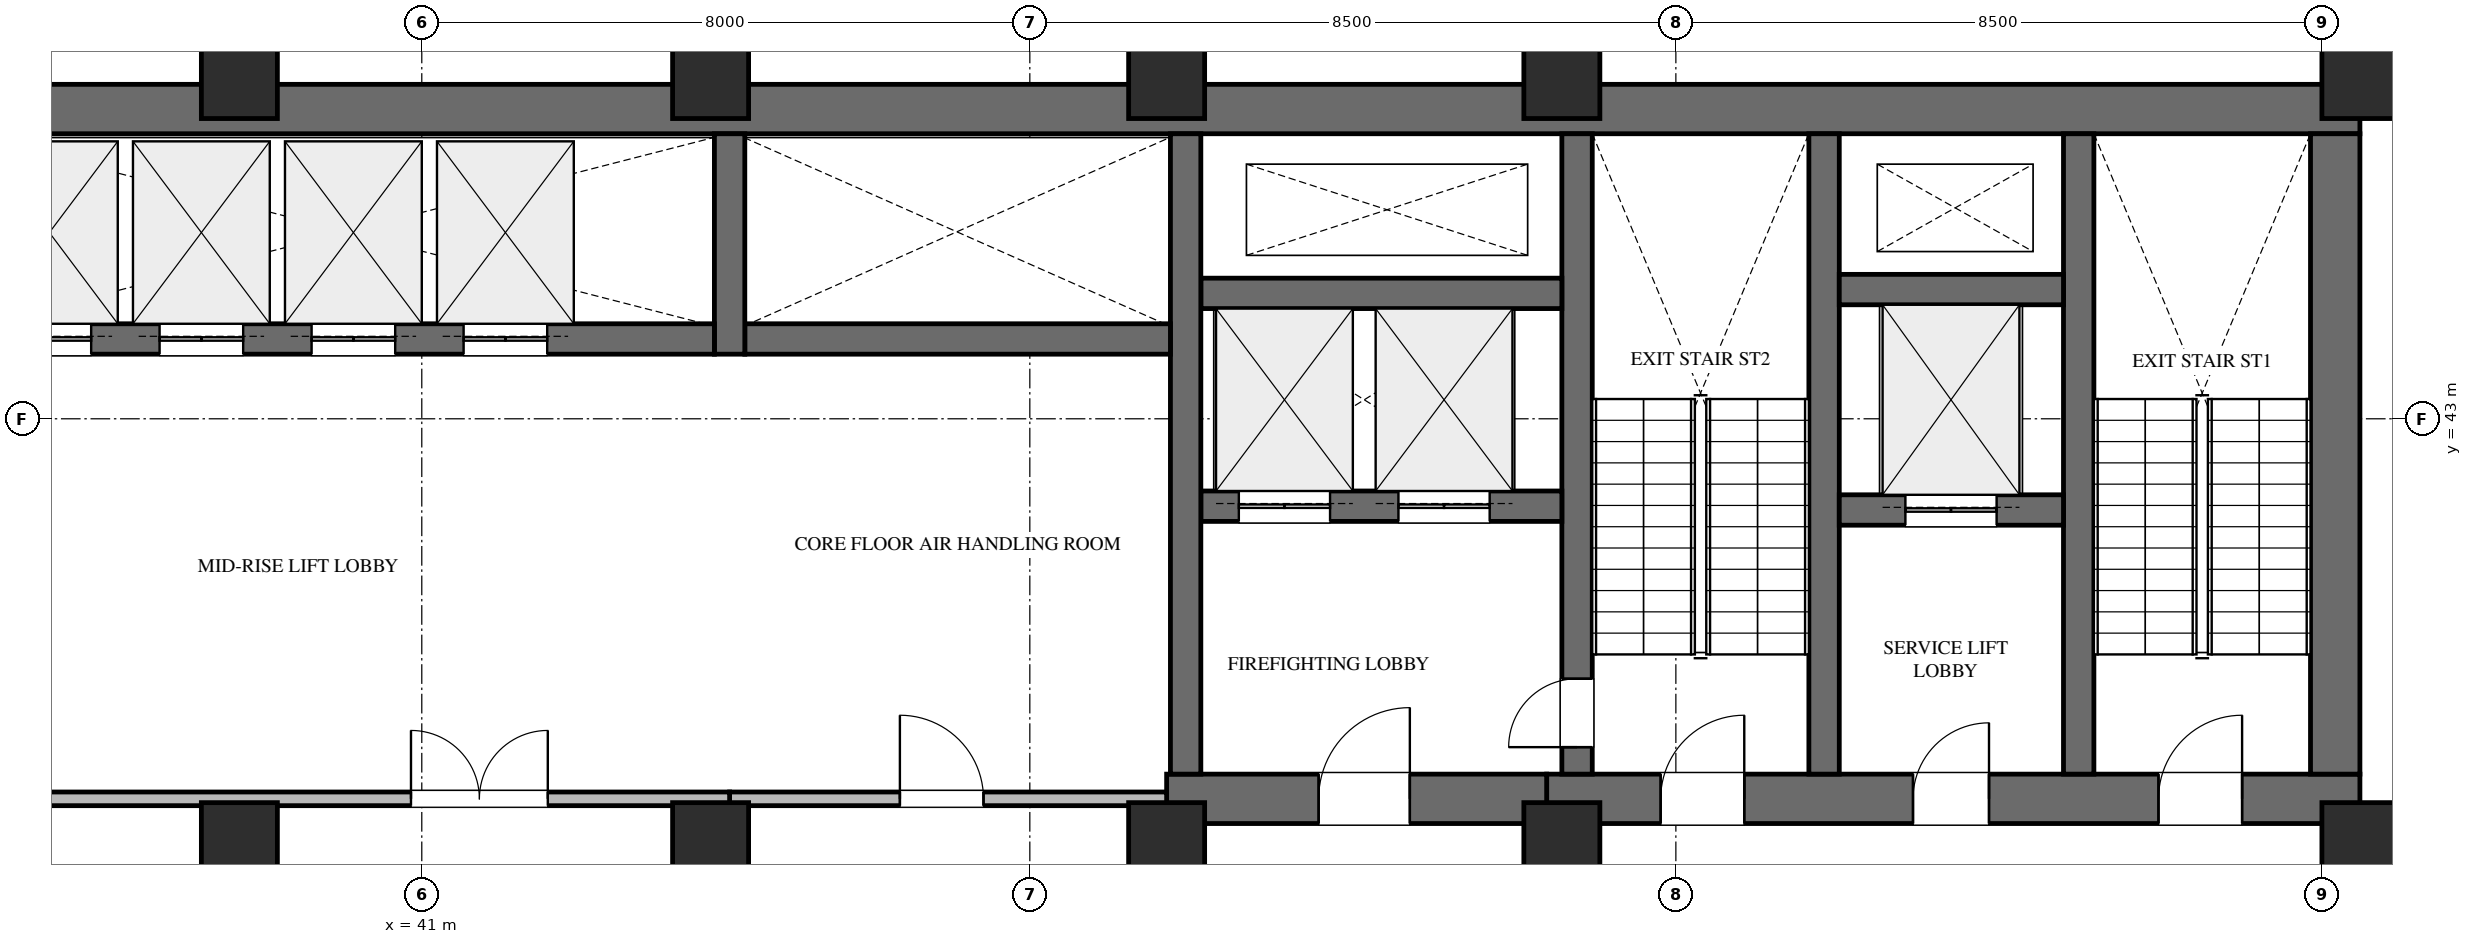
"""IFC4 building model, lengths in metres.
Left out: names, types, materials, properties, quantities, classifications, styles, units other than length and angle.
Written with IfcOpenShell. Run it as: python <this file> out.ifc"""

import sys

from ifc_helpers import new_model, si_unit, direction, frame, frame_2d, origin, origin_2d, place, context, subcontext, project, spatial, rectangle, extrude, element, fill, save


model = new_model("IFC4")
c1 = context("Model", 3, precision=1e-05, world=origin(), true_north=direction((0.0, 1.0)))
c2 = subcontext(c1, "Body", "Model", "MODEL_VIEW")
j1 = project(units=[si_unit("LENGTHUNIT", "METRE"), si_unit("PLANEANGLEUNIT", "RADIAN")], contexts=[c1])
p1 = place(None, origin())
s1 = spatial("IfcSite", under=j1, at=p1, CompositionType="ELEMENT")
p2 = place(p1, origin())
s2 = spatial("IfcBuilding", under=s1, at=p2, CompositionType="ELEMENT")
p3 = place(p2, frame((0.0, 0.0, 156.0)))
s3 = spatial("IfcBuildingStorey", under=s2, at=p3, CompositionType="ELEMENT", Elevation=156.0)
p4 = place(p3, frame((22.9, 47.075, 0.0), z_axis=(0.0, 0.0, 1.0), x_axis=(1.0, 0.0, 0.0)))
e1 = element("IfcWall", 1, at=p4, inside=s3, PredefinedType="SHEAR", context=c2, shape_type="SweptSolid", body=[
    extrude(rectangle(XDim=43.6, YDim=0.65, at=frame_2d((21.8, 0.0))), origin(), (0.0, 0.0, 1.0), 4.5),
])
p5 = place(p3, frame((55.8, 38.0, 0.0), z_axis=(0.0, 0.0, 1.0), x_axis=(1.0, 0.0, 0.0)))
e2 = element("IfcWall", 2, at=p5, inside=s3, PredefinedType="SHEAR", context=c2, shape_type="SweptSolid", body=[
    extrude(rectangle(XDim=10.7, YDim=0.65, at=frame_2d((5.35, 0.0))), origin(), (0.0, 0.0, 1.0), 4.5),
])
p6 = place(p5, frame((1.5, 0.0, 0.0)))
e3 = element("IfcOpeningElement", 3, at=p6, cuts=e2, PredefinedType="OPENING", context=c2, shape_type="SweptSolid", body=[
    extrude(rectangle(XDim=1.1, YDim=2.2, at=frame_2d((0.55, 1.1))), frame((0.0, 0.335, 0.0), z_axis=(0.0, -1.0, 0.0), x_axis=(1.0, 0.0, 0.0)), (0.0, 0.0, 1.0), 0.67),
])
p7 = place(p5, frame((4.82, 0.0, 0.0)))
e4 = element("IfcOpeningElement", 4, at=p7, cuts=e2, PredefinedType="OPENING", context=c2, shape_type="SweptSolid", body=[
    extrude(rectangle(XDim=1.0, YDim=2.15, at=frame_2d((0.5, 1.075))), frame((0.0, 0.335, 0.0), z_axis=(0.0, -1.0, 0.0), x_axis=(1.0, 0.0, 0.0)), (0.0, 0.0, 1.0), 0.67),
])
p8 = place(p5, frame((8.05, 0.0, 0.0)))
e5 = element("IfcOpeningElement", 5, at=p8, cuts=e2, PredefinedType="OPENING", context=c2, shape_type="SweptSolid", body=[
    extrude(rectangle(XDim=1.1, YDim=2.2, at=frame_2d((0.55, 1.1))), frame((0.0, 0.335, 0.0), z_axis=(0.0, -1.0, 0.0), x_axis=(1.0, 0.0, 0.0)), (0.0, 0.0, 1.0), 0.67),
])
p9 = place(p3, frame((66.175, 38.325, 0.0), z_axis=(0.0, 0.0, 1.0), x_axis=(0.0, 1.0, 0.0)))
e6 = element("IfcWall", 6, at=p9, inside=s3, PredefinedType="SHEAR", context=c2, shape_type="SweptSolid", body=[
    extrude(rectangle(XDim=8.425, YDim=0.65, at=frame_2d((4.212, 0.0))), origin(), (0.0, 0.0, 1.0), 4.5),
])
for number, where, z_axis, x_axis in (
    (7, (62.8, 38.325, 0.0), (0.0, 0.0, 1.0), (0.0, 1.0, 0.0)),
    (8, (59.45, 38.325, 0.0), (0.0, 0.0, 1.0), (0.0, 1.0, 0.0)),
):
    element("IfcWall", number, at=place(p3, frame(where, z_axis=z_axis, x_axis=x_axis)), inside=s3, PredefinedType="SHEAR", context=c2, shape_type="SweptSolid", body=[
        extrude(rectangle(XDim=8.425, YDim=0.4, at=frame_2d((4.212, 0.0))), origin(), (0.0, 0.0, 1.0), 4.5),
    ])
p10 = place(p3, frame((56.2, 38.325, 0.0), z_axis=(0.0, 0.0, 1.0), x_axis=(0.0, 1.0, 0.0)))
e9 = element("IfcWall", 9, at=p10, inside=s3, PredefinedType="SHEAR", context=c2, shape_type="SweptSolid", body=[
    extrude(rectangle(XDim=8.425, YDim=0.4, at=frame_2d((4.212, 0.0))), origin(), (0.0, 0.0, 1.0), 4.5),
])
p11 = place(p10, frame((0.355, 0.0, 0.0)))
e10 = element("IfcOpeningElement", 10, at=p11, cuts=e9, PredefinedType="OPENING", context=c2, shape_type="SweptSolid", body=[
    extrude(rectangle(XDim=0.9, YDim=2.15, at=frame_2d((0.45, 1.075))), frame((0.0, 0.21, 0.0), z_axis=(0.0, -1.0, 0.0), x_axis=(1.0, 0.0, 0.0)), (0.0, 0.0, 1.0), 0.42),
])
p12 = place(p3, frame((59.65, 41.8, 0.0), z_axis=(0.0, 0.0, 1.0), x_axis=(1.0, 0.0, 0.0)))
e11 = element("IfcWall", 11, at=p12, inside=s3, PredefinedType="SHEAR", context=c2, shape_type="SweptSolid", body=[
    extrude(rectangle(XDim=2.95, YDim=0.4, at=frame_2d((1.475, 0.0))), origin(), (0.0, 0.0, 1.0), 4.5),
])
p13 = place(p12, frame((0.87, 0.0, 0.0)))
e12 = element("IfcOpeningElement", 12, at=p13, cuts=e11, PredefinedType="OPENING", context=c2, shape_type="SweptSolid", body=[
    extrude(rectangle(XDim=1.2, YDim=2.2, at=frame_2d((0.6, 1.1))), frame((0.0, 0.21, 0.0), z_axis=(0.0, -1.0, 0.0), x_axis=(1.0, 0.0, 0.0)), (0.0, 0.0, 1.0), 0.42),
])
p14 = place(p3, frame((59.65, 44.7, 0.0), z_axis=(0.0, 0.0, 1.0), x_axis=(1.0, 0.0, 0.0)))
e13 = element("IfcWall", 13, at=p14, inside=s3, PredefinedType="SHEAR", context=c2, shape_type="SweptSolid", body=[
    extrude(rectangle(XDim=2.95, YDim=0.4, at=frame_2d((1.475, 0.0))), origin(), (0.0, 0.0, 1.0), 4.5),
])
p15 = place(p3, frame((50.8, 38.0, 0.0), z_axis=(0.0, 0.0, 1.0), x_axis=(1.0, 0.0, 0.0)))
e14 = element("IfcWall", 14, at=p15, inside=s3, PredefinedType="SHEAR", context=c2, shape_type="SweptSolid", body=[
    extrude(rectangle(XDim=5.0, YDim=0.65, at=frame_2d((2.5, 0.0))), origin(), (0.0, 0.0, 1.0), 4.5),
])
p16 = place(p15, frame((2.0, 0.0, 0.0)))
e15 = element("IfcOpeningElement", 15, at=p16, cuts=e14, PredefinedType="OPENING", context=c2, shape_type="SweptSolid", body=[
    extrude(rectangle(XDim=1.2, YDim=2.2, at=frame_2d((0.6, 1.1))), frame((0.0, 0.335, 0.0), z_axis=(0.0, -1.0, 0.0), x_axis=(1.0, 0.0, 0.0)), (0.0, 0.0, 1.0), 0.67),
])
p17 = place(p3, frame((51.25, 41.85, 0.0), z_axis=(0.0, 0.0, 1.0), x_axis=(1.0, 0.0, 0.0)))
e16 = element("IfcWall", 16, at=p17, inside=s3, PredefinedType="SHEAR", context=c2, shape_type="SweptSolid", body=[
    extrude(rectangle(XDim=4.75, YDim=0.4, at=frame_2d((2.375, 0.0))), origin(), (0.0, 0.0, 1.0), 4.5),
])
p18 = place(p17, frame((0.5, 0.0, 0.0)))
e17 = element("IfcOpeningElement", 17, at=p18, cuts=e16, PredefinedType="OPENING", context=c2, shape_type="SweptSolid", body=[
    extrude(rectangle(XDim=1.2, YDim=2.2, at=frame_2d((0.6, 1.1))), frame((0.0, 0.21, 0.0), z_axis=(0.0, -1.0, 0.0), x_axis=(1.0, 0.0, 0.0)), (0.0, 0.0, 1.0), 0.42),
])
p19 = place(p17, frame((2.6, 0.0, 0.0)))
e18 = element("IfcOpeningElement", 18, at=p19, cuts=e16, PredefinedType="OPENING", context=c2, shape_type="SweptSolid", body=[
    extrude(rectangle(XDim=1.2, YDim=2.2, at=frame_2d((0.6, 1.1))), frame((0.0, 0.21, 0.0), z_axis=(0.0, -1.0, 0.0), x_axis=(1.0, 0.0, 0.0)), (0.0, 0.0, 1.0), 0.42),
])
p20 = place(p3, frame((51.25, 44.65, 0.0), z_axis=(0.0, 0.0, 1.0), x_axis=(1.0, 0.0, 0.0)))
e19 = element("IfcWall", 19, at=p20, inside=s3, PredefinedType="SHEAR", context=c2, shape_type="SweptSolid", body=[
    extrude(rectangle(XDim=4.75, YDim=0.4, at=frame_2d((2.375, 0.0))), origin(), (0.0, 0.0, 1.0), 4.5),
])
p21 = place(p3, frame((51.05, 38.325, 0.0), z_axis=(0.0, 0.0, 1.0), x_axis=(0.0, 1.0, 0.0)))
e20 = element("IfcWall", 20, at=p21, inside=s3, PredefinedType="SHEAR", context=c2, shape_type="SweptSolid", body=[
    extrude(rectangle(XDim=8.425, YDim=0.4, at=frame_2d((4.212, 0.0))), origin(), (0.0, 0.0, 1.0), 4.5),
])
p22 = place(p3, frame((45.25, 44.05, 0.0), z_axis=(0.0, 0.0, 1.0), x_axis=(1.0, 0.0, 0.0)))
e21 = element("IfcWall", 21, at=p22, inside=s3, PredefinedType="SHEAR", context=c2, shape_type="SweptSolid", body=[
    extrude(rectangle(XDim=5.6, YDim=0.4, at=frame_2d((2.8, 0.0))), origin(), (0.0, 0.0, 1.0), 4.5),
])
p23 = place(p3, frame((45.05, 43.85, 0.0), z_axis=(0.0, 0.0, 1.0), x_axis=(0.0, 1.0, 0.0)))
e22 = element("IfcWall", 22, at=p23, inside=s3, PredefinedType="SHEAR", context=c2, shape_type="SweptSolid", body=[
    extrude(rectangle(XDim=2.9, YDim=0.4, at=frame_2d((1.45, 0.0))), origin(), (0.0, 0.0, 1.0), 4.5),
])
p24 = place(p3, frame((35.2, 44.05, 0.0), z_axis=(0.0, 0.0, 1.0), x_axis=(1.0, 0.0, 0.0)))
e23 = element("IfcWall", 23, at=p24, inside=s3, PredefinedType="SHEAR", context=c2, shape_type="SweptSolid", body=[
    extrude(rectangle(XDim=9.65, YDim=0.4, at=frame_2d((4.825, 0.0))), origin(), (0.0, 0.0, 1.0), 4.5),
])
p25 = place(p24, frame((0.35, 0.0, 0.0)))
e24 = element("IfcOpeningElement", 24, at=p25, cuts=e23, PredefinedType="OPENING", context=c2, shape_type="SweptSolid", body=[
    extrude(rectangle(XDim=1.1, YDim=2.2, at=frame_2d((0.55, 1.1))), frame((0.0, 0.21, 0.0), z_axis=(0.0, -1.0, 0.0), x_axis=(1.0, 0.0, 0.0)), (0.0, 0.0, 1.0), 0.42),
])
p26 = place(p24, frame((2.35, 0.0, 0.0)))
e25 = element("IfcOpeningElement", 25, at=p26, cuts=e23, PredefinedType="OPENING", context=c2, shape_type="SweptSolid", body=[
    extrude(rectangle(XDim=1.1, YDim=2.2, at=frame_2d((0.55, 1.1))), frame((0.0, 0.21, 0.0), z_axis=(0.0, -1.0, 0.0), x_axis=(1.0, 0.0, 0.0)), (0.0, 0.0, 1.0), 0.42),
])
p27 = place(p24, frame((4.35, 0.0, 0.0)))
e26 = element("IfcOpeningElement", 26, at=p27, cuts=e23, PredefinedType="OPENING", context=c2, shape_type="SweptSolid", body=[
    extrude(rectangle(XDim=1.1, YDim=2.2, at=frame_2d((0.55, 1.1))), frame((0.0, 0.21, 0.0), z_axis=(0.0, -1.0, 0.0), x_axis=(1.0, 0.0, 0.0)), (0.0, 0.0, 1.0), 0.42),
])
p28 = place(p24, frame((6.35, 0.0, 0.0)))
e27 = element("IfcOpeningElement", 27, at=p28, cuts=e23, PredefinedType="OPENING", context=c2, shape_type="SweptSolid", body=[
    extrude(rectangle(XDim=1.1, YDim=2.2, at=frame_2d((0.55, 1.1))), frame((0.0, 0.21, 0.0), z_axis=(0.0, -1.0, 0.0), x_axis=(1.0, 0.0, 0.0)), (0.0, 0.0, 1.0), 0.42),
])
for number, where, z_axis, x_axis in (
    (28, (66.5, 47.55, 0.0), (0.0, 0.0, 1.0), (1.0, 0.0, 0.0)),
    (29, (56.0, 47.55, 0.0), (0.0, 0.0, 1.0), (1.0, 0.0, 0.0)),
    (30, (66.5, 37.35, 0.0), (0.0, 0.0, 1.0), (1.0, 0.0, 0.0)),
    (31, (56.0, 37.35, 0.0), (0.0, 0.0, 1.0), (1.0, 0.0, 0.0)),
    (32, (50.8, 47.55, 0.0), (0.0, 0.0, 1.0), (1.0, 0.0, 0.0)),
    (33, (50.8, 37.35, 0.0), (0.0, 0.0, 1.0), (1.0, 0.0, 0.0)),
    (34, (44.8, 37.35, 0.0), (0.0, 0.0, 1.0), (1.0, 0.0, 0.0)),
    (35, (44.8, 47.55, 0.0), (0.0, 0.0, 1.0), (1.0, 0.0, 0.0)),
    (36, (38.6, 37.35, 0.0), (0.0, 0.0, 1.0), (1.0, 0.0, 0.0)),
    (37, (38.6, 47.55, 0.0), (0.0, 0.0, 1.0), (1.0, 0.0, 0.0)),
):
    element("IfcColumn", number, at=place(p3, frame(where, z_axis=z_axis, x_axis=x_axis)), inside=s3, PredefinedType="COLUMN", context=c2, shape_type="SweptSolid", body=[
        extrude(rectangle(XDim=1.0, YDim=1.2, at=origin_2d()), origin(), (0.0, 0.0, 1.0), 4.5),
    ])
p29 = place(p3, frame((68.355, 37.8, 0.0), z_axis=(0.0, 0.0, 1.0), x_axis=(-0.139168083715, -0.990268773856, 0.0)))
e38 = element("IfcWall", 38, at=p29, inside=s3, PredefinedType="STANDARD", context=c2, shape_type="SweptSolid", body=[
    extrude(rectangle(XDim=29.539, YDim=0.28, at=frame_2d((14.769, 0.0))), origin(), (0.0, 0.0, 1.0), 4.25),
])
p30 = place(p3, frame((45.05, 38.0, 0.0), z_axis=(0.0, 0.0, 1.0), x_axis=(1.0, 0.0, 0.0)))
e39 = element("IfcWall", 39, at=p30, inside=s3, PredefinedType="STANDARD", context=c2, shape_type="SweptSolid", body=[
    extrude(rectangle(XDim=5.75, YDim=0.18, at=frame_2d((2.875, 0.0))), origin(), (0.0, 0.0, 1.0), 3.394),
])
p31 = place(p30, frame((2.24, 0.0, 0.0)))
e40 = element("IfcOpeningElement", 40, at=p31, cuts=e39, PredefinedType="OPENING", context=c2, shape_type="SweptSolid", body=[
    extrude(rectangle(XDim=1.1, YDim=2.2, at=frame_2d((0.55, 1.1))), frame((0.0, 0.1, 0.0), z_axis=(0.0, -1.0, 0.0), x_axis=(1.0, 0.0, 0.0)), (0.0, 0.0, 1.0), 0.2),
])
p32 = place(p3, frame((35.0, 38.0, 0.0), z_axis=(0.0, 0.0, 1.0), x_axis=(1.0, 0.0, 0.0)))
e41 = element("IfcWall", 41, at=p32, inside=s3, PredefinedType="STANDARD", context=c2, shape_type="SweptSolid", body=[
    extrude(rectangle(XDim=10.05, YDim=0.18, at=frame_2d((5.025, 0.0))), origin(), (0.0, 0.0, 1.0), 3.394),
])
p33 = place(p32, frame((5.858, 0.0, 0.0)))
e42 = element("IfcOpeningElement", 42, at=p33, cuts=e41, PredefinedType="OPENING", context=c2, shape_type="SweptSolid", body=[
    extrude(rectangle(XDim=1.8, YDim=2.2, at=frame_2d((0.9, 1.1))), frame((0.0, 0.1, 0.0), z_axis=(0.0, -1.0, 0.0), x_axis=(1.0, 0.0, 0.0)), (0.0, 0.0, 1.0), 0.2),
])
p34 = place(p3, frame((66.5, 34.468, 0.0), z_axis=(0.0, 0.0, 1.0), x_axis=(0.0, 1.0, 0.0)))
e43 = element("IfcWall", 43, at=p34, inside=s3, PredefinedType="STANDARD", context=c2, shape_type="SweptSolid", body=[
    extrude(rectangle(XDim=3.199, YDim=0.18, at=frame_2d((1.6, 0.0))), origin(), (0.0, 0.0, 1.0), 3.394),
])
p35 = place(p6, origin())
e44 = element("IfcDoor", 44, at=p35, inside=s3, OperationType="SINGLE_SWING_RIGHT", PredefinedType="DOOR", context=c2, shape_type="SweptSolid", body=[
    extrude(rectangle(XDim=1.1, YDim=2.2, at=frame_2d((0.55, 1.1))), frame((0.0, 0.025, 0.0), z_axis=(0.0, -1.0, 0.0), x_axis=(1.0, 0.0, 0.0)), (0.0, 0.0, 1.0), 0.05),
])
fill(e3, e44)
p36 = place(p7, origin())
e45 = element("IfcDoor", 45, at=p36, inside=s3, OperationType="SINGLE_SWING_RIGHT", PredefinedType="DOOR", context=c2, shape_type="SweptSolid", body=[
    extrude(rectangle(XDim=1.0, YDim=2.15, at=frame_2d((0.5, 1.075))), frame((0.0, 0.025, 0.0), z_axis=(0.0, -1.0, 0.0), x_axis=(1.0, 0.0, 0.0)), (0.0, 0.0, 1.0), 0.05),
])
fill(e4, e45)
p37 = place(p8, origin())
e46 = element("IfcDoor", 46, at=p37, inside=s3, OperationType="SINGLE_SWING_RIGHT", PredefinedType="DOOR", context=c2, shape_type="SweptSolid", body=[
    extrude(rectangle(XDim=1.1, YDim=2.2, at=frame_2d((0.55, 1.1))), frame((0.0, 0.025, 0.0), z_axis=(0.0, -1.0, 0.0), x_axis=(1.0, 0.0, 0.0)), (0.0, 0.0, 1.0), 0.05),
])
fill(e5, e46)
p38 = place(p16, origin())
e47 = element("IfcDoor", 47, at=p38, inside=s3, OperationType="SINGLE_SWING_RIGHT", PredefinedType="DOOR", context=c2, shape_type="SweptSolid", body=[
    extrude(rectangle(XDim=1.2, YDim=2.2, at=frame_2d((0.6, 1.1))), frame((0.0, 0.025, 0.0), z_axis=(0.0, -1.0, 0.0), x_axis=(1.0, 0.0, 0.0)), (0.0, 0.0, 1.0), 0.05),
])
fill(e15, e47)
p39 = place(p11, origin())
e48 = element("IfcDoor", 48, at=p39, inside=s3, OperationType="SINGLE_SWING_LEFT", PredefinedType="DOOR", context=c2, shape_type="SweptSolid", body=[
    extrude(rectangle(XDim=0.9, YDim=2.15, at=frame_2d((0.45, 1.075))), frame((0.0, 0.025, 0.0), z_axis=(0.0, -1.0, 0.0), x_axis=(1.0, 0.0, 0.0)), (0.0, 0.0, 1.0), 0.05),
])
fill(e10, e48)
p40 = place(p25, origin())
e49 = element("IfcDoor", 49, at=p40, inside=s3, OperationType="DOUBLE_DOOR_SLIDING", PredefinedType="DOOR", context=c2, shape_type="SweptSolid", body=[
    extrude(rectangle(XDim=1.1, YDim=2.2, at=frame_2d((0.55, 1.1))), frame((0.0, 0.025, 0.0), z_axis=(0.0, -1.0, 0.0), x_axis=(1.0, 0.0, 0.0)), (0.0, 0.0, 1.0), 0.05),
])
fill(e24, e49)
p41 = place(p26, origin())
e50 = element("IfcDoor", 50, at=p41, inside=s3, OperationType="DOUBLE_DOOR_SLIDING", PredefinedType="DOOR", context=c2, shape_type="SweptSolid", body=[
    extrude(rectangle(XDim=1.1, YDim=2.2, at=frame_2d((0.55, 1.1))), frame((0.0, 0.025, 0.0), z_axis=(0.0, -1.0, 0.0), x_axis=(1.0, 0.0, 0.0)), (0.0, 0.0, 1.0), 0.05),
])
fill(e25, e50)
p42 = place(p27, origin())
e51 = element("IfcDoor", 51, at=p42, inside=s3, OperationType="DOUBLE_DOOR_SLIDING", PredefinedType="DOOR", context=c2, shape_type="SweptSolid", body=[
    extrude(rectangle(XDim=1.1, YDim=2.2, at=frame_2d((0.55, 1.1))), frame((0.0, 0.025, 0.0), z_axis=(0.0, -1.0, 0.0), x_axis=(1.0, 0.0, 0.0)), (0.0, 0.0, 1.0), 0.05),
])
fill(e26, e51)
p43 = place(p28, origin())
e52 = element("IfcDoor", 52, at=p43, inside=s3, OperationType="DOUBLE_DOOR_SLIDING", PredefinedType="DOOR", context=c2, shape_type="SweptSolid", body=[
    extrude(rectangle(XDim=1.1, YDim=2.2, at=frame_2d((0.55, 1.1))), frame((0.0, 0.025, 0.0), z_axis=(0.0, -1.0, 0.0), x_axis=(1.0, 0.0, 0.0)), (0.0, 0.0, 1.0), 0.05),
])
fill(e27, e52)
p44 = place(p18, origin())
e53 = element("IfcDoor", 53, at=p44, inside=s3, OperationType="DOUBLE_DOOR_SLIDING", PredefinedType="DOOR", context=c2, shape_type="SweptSolid", body=[
    extrude(rectangle(XDim=1.2, YDim=2.2, at=frame_2d((0.6, 1.1))), frame((0.0, 0.025, 0.0), z_axis=(0.0, -1.0, 0.0), x_axis=(1.0, 0.0, 0.0)), (0.0, 0.0, 1.0), 0.05),
])
fill(e17, e53)
p45 = place(p19, origin())
e54 = element("IfcDoor", 54, at=p45, inside=s3, OperationType="DOUBLE_DOOR_SLIDING", PredefinedType="DOOR", context=c2, shape_type="SweptSolid", body=[
    extrude(rectangle(XDim=1.2, YDim=2.2, at=frame_2d((0.6, 1.1))), frame((0.0, 0.025, 0.0), z_axis=(0.0, -1.0, 0.0), x_axis=(1.0, 0.0, 0.0)), (0.0, 0.0, 1.0), 0.05),
])
fill(e18, e54)
p46 = place(p13, origin())
e55 = element("IfcDoor", 55, at=p46, inside=s3, OperationType="DOUBLE_DOOR_SLIDING", PredefinedType="DOOR", context=c2, shape_type="SweptSolid", body=[
    extrude(rectangle(XDim=1.2, YDim=2.2, at=frame_2d((0.6, 1.1))), frame((0.0, 0.025, 0.0), z_axis=(0.0, -1.0, 0.0), x_axis=(1.0, 0.0, 0.0)), (0.0, 0.0, 1.0), 0.05),
])
fill(e12, e55)
p47 = place(p31, origin())
e56 = element("IfcDoor", 56, at=p47, inside=s3, OperationType="SINGLE_SWING_LEFT", PredefinedType="DOOR", context=c2, shape_type="SweptSolid", body=[
    extrude(rectangle(XDim=1.1, YDim=2.2, at=frame_2d((0.55, 1.1))), frame((0.0, 0.025, 0.0), z_axis=(0.0, -1.0, 0.0), x_axis=(1.0, 0.0, 0.0)), (0.0, 0.0, 1.0), 0.05),
])
fill(e40, e56)
p48 = place(p33, origin())
e57 = element("IfcDoor", 57, at=p48, inside=s3, OperationType="DOUBLE_DOOR_SINGLE_SWING", PredefinedType="DOOR", context=c2, shape_type="SweptSolid", body=[
    extrude(rectangle(XDim=1.8, YDim=2.2, at=frame_2d((0.9, 1.1))), frame((0.0, 0.025, 0.0), z_axis=(0.0, -1.0, 0.0), x_axis=(1.0, 0.0, 0.0)), (0.0, 0.0, 1.0), 0.05),
])
fill(e42, e57)
save(model, sys.argv[1])
